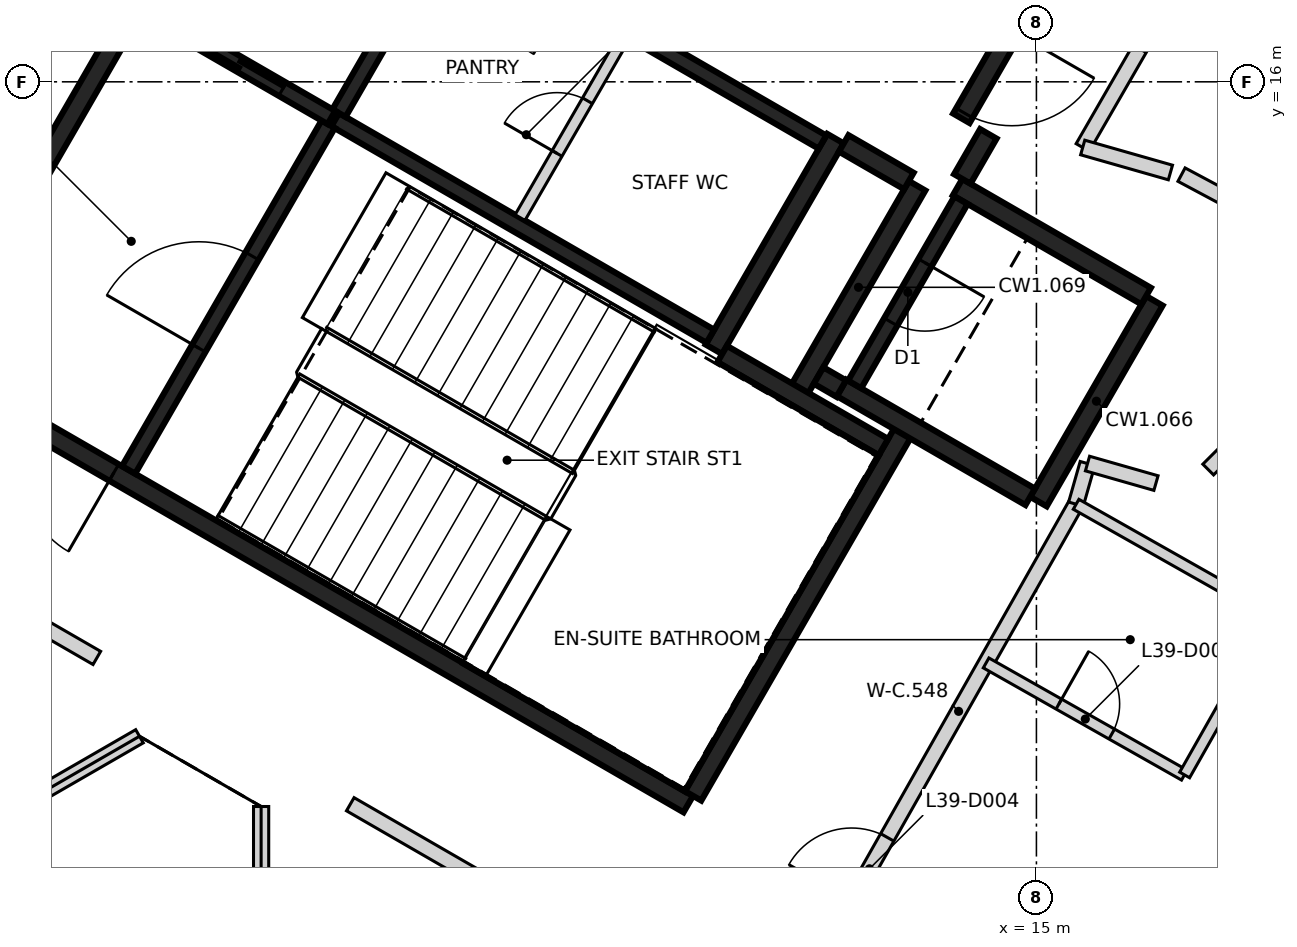
"""IFC4 building model, lengths in metres.
Left out: names, types, materials, properties, quantities, classifications, styles, units other than length and angle.
Written with IfcOpenShell. Run it as: python <this file> out.ifc"""

import sys

from ifc_helpers import new_model, si_unit, direction, frame, frame_2d, origin, place, context, subcontext, project, spatial, rectangle, extrude, element, fill, save


model = new_model("IFC4")
c1 = context("Model", 3, precision=1e-05, world=origin(), true_north=direction((0.0, 1.0)))
c2 = subcontext(c1, "Body", "Model", "MODEL_VIEW")
j1 = project(units=[si_unit("LENGTHUNIT", "METRE"), si_unit("PLANEANGLEUNIT", "RADIAN")], contexts=[c1])
p1 = place(None, origin())
s1 = spatial("IfcSite", under=j1, at=p1, CompositionType="ELEMENT")
p2 = place(p1, origin())
s2 = spatial("IfcBuilding", under=s1, at=p2, CompositionType="ELEMENT")
p3 = place(p2, frame((0.0, 0.0, 157.6)))
s3 = spatial("IfcBuildingStorey", under=s2, at=p3, CompositionType="ELEMENT", Elevation=157.6)
p4 = place(p3, frame((10.42, 6.498, 0.0), z_axis=(0.0, 0.0, 1.0), x_axis=(-0.866021906294, 0.500006057782, 0.0)))
e1 = element("IfcWall", 1, at=p4, inside=s3, PredefinedType="SHEAR", context=c2, shape_type="SweptSolid", body=[
    extrude(rectangle(XDim=11.55, YDim=0.25, at=frame_2d((5.775, 0.0))), origin(), (0.0, 0.0, 1.0), 3.2),
])
p5 = place(p4, frame((10.025, 0.0, 0.0)))
e2 = element("IfcOpeningElement", 2, at=p5, cuts=e1, PredefinedType="OPENING", context=c2, shape_type="SweptSolid", body=[
    extrude(rectangle(XDim=1.2, YDim=2.1, at=frame_2d((0.6, 1.05))), frame((0.0, 0.135, 0.0), z_axis=(0.0, -1.0, 0.0), x_axis=(1.0, 0.0, 0.0)), (0.0, 0.0, 1.0), 0.27),
])
p6 = place(p4, frame((8.725, 0.0, 0.0)))
e3 = element("IfcOpeningElement", 3, at=p6, cuts=e1, PredefinedType="OPENING", context=c2, shape_type="SweptSolid", body=[
    extrude(rectangle(XDim=1.2, YDim=2.1, at=frame_2d((0.6, 1.05))), frame((0.0, 0.135, 0.0), z_axis=(0.0, -1.0, 0.0), x_axis=(1.0, 0.0, 0.0)), (0.0, 0.0, 1.0), 0.27),
])
p7 = place(p3, frame((0.48, 12.381, 0.0), z_axis=(0.0, 0.0, 1.0), x_axis=(0.49999885962, 0.866026062182, 0.0)))
e4 = element("IfcWall", 4, at=p7, inside=s3, PredefinedType="SHEAR", context=c2, shape_type="SweptSolid", body=[
    extrude(rectangle(XDim=5.225, YDim=0.25, at=frame_2d((2.612, 0.0))), origin(), (0.0, 0.0, 1.0), 3.2),
])
p8 = place(p3, frame((13.238, 11.378, 0.0), z_axis=(0.0, 0.0, 1.0), x_axis=(-0.500008851346, -0.866020293397, 0.0)))
e5 = element("IfcWall", 5, at=p8, inside=s3, PredefinedType="SHEAR", context=c2, shape_type="SweptSolid", body=[
    extrude(rectangle(XDim=5.51, YDim=0.25, at=frame_2d((2.755, 0.0))), origin(), (0.0, 0.0, 1.0), 3.2),
])
p9 = place(p3, frame((12.357, 15.252, 0.0), z_axis=(0.0, 0.0, 1.0), x_axis=(-0.500028443584, -0.866008981251, 0.0)))
e6 = element("IfcWall", 6, at=p9, inside=s3, PredefinedType="SHEAR", context=c2, shape_type="SweptSolid", body=[
    extrude(rectangle(XDim=3.2, YDim=0.25, at=frame_2d((1.6, 0.0))), origin(), (0.0, 0.0, 1.0), 3.2),
])
p10 = place(p3, frame((16.552, 13.119, 0.0), z_axis=(0.0, 0.0, 1.0), x_axis=(-0.499978833458, -0.866037623948, 0.0)))
e7 = element("IfcWall", 7, at=p10, inside=s3, PredefinedType="SHEAR", context=c2, shape_type="SweptSolid", body=[
    extrude(rectangle(XDim=3.05, YDim=0.25, at=frame_2d((1.525, 0.0))), origin(), (0.0, 0.0, 1.0), 3.2),
])
p11 = place(p3, frame((14.918, 10.54, 0.0), z_axis=(0.0, 0.0, 1.0), x_axis=(-0.866063538972, 0.499933942099, 0.0)))
e8 = element("IfcWall", 8, at=p11, inside=s3, PredefinedType="SHEAR", context=c2, shape_type="SweptSolid", body=[
    extrude(rectangle(XDim=2.865, YDim=0.25, at=frame_2d((1.432, 0.0))), origin(), (0.0, 0.0, 1.0), 3.2),
])
p12 = place(p3, frame((13.963, 14.614, 0.0), z_axis=(0.0, 0.0, 1.0), x_axis=(0.866042235819, -0.499970844928, 0.0)))
e9 = element("IfcWall", 9, at=p12, inside=s3, PredefinedType="SHEAR", context=c2, shape_type="SweptSolid", body=[
    extrude(rectangle(XDim=2.865, YDim=0.25, at=frame_2d((1.432, 0.0))), origin(), (0.0, 0.0, 1.0), 3.2),
])
p13 = place(p3, frame((11.888, 11.961, 0.0), z_axis=(0.0, 0.0, 1.0), x_axis=(0.500003324108, 0.866023484601, 0.0)))
e10 = element("IfcWall", 10, at=p13, inside=s3, PredefinedType="SHEAR", context=c2, shape_type="SweptSolid", body=[
    extrude(rectangle(XDim=3.085, YDim=0.25, at=frame_2d((1.542, 0.0))), origin(), (0.0, 0.0, 1.0), 3.2),
])
p14 = place(p3, frame((10.865, 12.418, 0.0), z_axis=(0.0, 0.0, 1.0), x_axis=(0.866026229868, -0.499998569178, 0.0)))
e11 = element("IfcWall", 11, at=p14, inside=s3, PredefinedType="SHEAR", context=c2, shape_type="SweptSolid", body=[
    extrude(rectangle(XDim=2.449, YDim=0.25, at=frame_2d((1.225, 0.0))), origin(), (0.0, 0.0, 1.0), 3.2),
])
p15 = place(p3, frame((14.945, 17.135, 0.0), z_axis=(0.0, 0.0, 1.0), x_axis=(-0.499983108224, -0.866035156036, 0.0)))
e12 = element("IfcWall", 12, at=p15, inside=s3, PredefinedType="SHEAR", context=c2, shape_type="SweptSolid", body=[
    extrude(rectangle(XDim=1.865, YDim=0.25, at=frame_2d((0.932, 0.0))), origin(), (0.0, 0.0, 1.0), 3.2),
])
p16 = place(p15, frame((0.535, 0.0, 0.0)))
e13 = element("IfcOpeningElement", 13, at=p16, cuts=e12, PredefinedType="OPENING", context=c2, shape_type="SweptSolid", body=[
    extrude(rectangle(XDim=1.25, YDim=2.1, at=frame_2d((0.625, 1.05))), frame((0.0, 0.135, 0.0), z_axis=(0.0, -1.0, 0.0), x_axis=(1.0, 0.0, 0.0)), (0.0, 0.0, 1.0), 0.27),
])
p17 = place(p3, frame((13.322, 14.695, 0.0), z_axis=(0.0, 0.0, 1.0), x_axis=(-0.866017078145, 0.500014420154, 0.0)))
e14 = element("IfcWall", 14, at=p17, inside=s3, PredefinedType="SHEAR", context=c2, shape_type="SweptSolid", body=[
    extrude(rectangle(XDim=0.989, YDim=0.25, at=frame_2d((0.495, 0.0))), origin(), (0.0, 0.0, 1.0), 3.2),
])
p18 = place(p3, frame((14.368, 15.315, 0.0), z_axis=(0.0, 0.0, 1.0), x_axis=(-0.499897359611, -0.866084655132, 0.0)))
e15 = element("IfcWall", 15, at=p18, inside=s3, PredefinedType="SHEAR", context=c2, shape_type="SweptSolid", body=[
    extrude(rectangle(XDim=0.685, YDim=0.25, at=frame_2d((0.342, 0.0))), origin(), (0.0, 0.0, 1.0), 3.2),
])
p19 = place(p3, frame((12.433, 11.964, 0.0), z_axis=(0.0, 0.0, 1.0), x_axis=(-0.866055875208, 0.499947218231, 0.0)))
e16 = element("IfcWall", 16, at=p19, inside=s3, PredefinedType="SHEAR", context=c2, shape_type="SweptSolid", body=[
    extrude(rectangle(XDim=0.345, YDim=0.25, at=frame_2d((0.172, 0.0))), origin(), (0.0, 0.0, 1.0), 3.2),
])
p20 = place(p3, frame((5.775, 15.502, 0.0), z_axis=(0.0, 0.0, 1.0), x_axis=(0.866020080793, -0.500009219579, 0.0)))
e17 = element("IfcWall", 17, at=p20, inside=s3, PredefinedType="SHEAR", context=c2, shape_type="SweptSolid", body=[
    extrude(rectangle(XDim=5.699, YDim=0.2, at=frame_2d((2.85, 0.0))), origin(), (0.0, 0.0, 1.0), 3.2),
])
p21 = place(p3, frame((12.185, 15.207, 0.0), z_axis=(0.0, 0.0, 1.0), x_axis=(-0.866020080793, 0.500009219579, 0.0)))
e18 = element("IfcWall", 18, at=p21, inside=s3, PredefinedType="SHEAR", context=c2, shape_type="SweptSolid", body=[
    extrude(rectangle(XDim=5.699, YDim=0.2, at=frame_2d((2.85, 0.0))), origin(), (0.0, 0.0, 1.0), 3.2),
])
p22 = place(p21, frame((3.874, 0.0, 0.0)))
e19 = element("IfcOpeningElement", 19, at=p22, cuts=e18, PredefinedType="OPENING", context=c2, shape_type="SweptSolid", body=[
    extrude(rectangle(XDim=0.9, YDim=2.1, at=frame_2d((0.45, 1.05))), frame((0.0, 0.11, 0.0), z_axis=(0.0, -1.0, 0.0), x_axis=(1.0, 0.0, 0.0)), (0.0, 0.0, 1.0), 0.22),
])
p23 = place(p3, frame((3.057, 10.895, 0.0), z_axis=(0.0, 0.0, 1.0), x_axis=(0.499989418164, 0.866031513124, 0.0)))
e20 = element("IfcWall", 20, at=p23, inside=s3, PredefinedType="SHEAR", context=c2, shape_type="SweptSolid", body=[
    extrude(rectangle(XDim=5.251, YDim=0.2, at=frame_2d((2.625, 0.0))), origin(), (0.0, 0.0, 1.0), 3.2),
])
p24 = place(p23, frame((1.849, 0.0, 0.0)))
e21 = element("IfcOpeningElement", 21, at=p24, cuts=e20, PredefinedType="OPENING", context=c2, shape_type="SweptSolid", body=[
    extrude(rectangle(XDim=1.4, YDim=2.1, at=frame_2d((0.7, 1.05))), frame((0.0, 0.11, 0.0), z_axis=(0.0, -1.0, 0.0), x_axis=(1.0, 0.0, 0.0)), (0.0, 0.0, 1.0), 0.22),
])
p25 = place(p3, frame((14.008, 14.442, 0.0), z_axis=(0.0, 0.0, 1.0), x_axis=(-0.499986818241, -0.866033014143, 0.0)))
e22 = element("IfcWall", 22, at=p25, inside=s3, PredefinedType="SHEAR", context=c2, shape_type="SweptSolid", body=[
    extrude(rectangle(XDim=2.798, YDim=0.2, at=frame_2d((1.399, 0.0))), origin(), (0.0, 0.0, 1.0), 3.2),
])
p26 = place(p25, frame((0.949, 0.0, 0.0)))
e23 = element("IfcOpeningElement", 23, at=p26, cuts=e22, PredefinedType="OPENING", context=c2, shape_type="SweptSolid", body=[
    extrude(rectangle(XDim=0.9, YDim=2.1, at=frame_2d((0.45, 1.05))), frame((0.0, 0.11, 0.0), z_axis=(0.0, -1.0, 0.0), x_axis=(1.0, 0.0, 0.0)), (0.0, 0.0, 1.0), 0.22),
])
p27 = place(p3, frame((7.199, 17.97, 0.0), z_axis=(0.0, 0.0, 1.0), x_axis=(-0.499968400327, -0.866043647095, 0.0)))
e24 = element("IfcWall", 24, at=p27, inside=s3, PredefinedType="SHEAR", context=c2, shape_type="SweptSolid", body=[
    extrude(rectangle(XDim=2.75, YDim=0.2, at=frame_2d((1.375, 0.0))), origin(), (0.0, 0.0, 1.0), 3.2),
])
p28 = place(p3, frame((5.725, 15.531, 0.0), z_axis=(0.0, 0.0, 1.0), x_axis=(-0.866037306777, 0.499979382845, 0.0)))
e25 = element("IfcWall", 25, at=p28, inside=s3, PredefinedType="SHEAR", context=c2, shape_type="SweptSolid", body=[
    extrude(rectangle(XDim=2.742, YDim=0.2, at=frame_2d((1.371, 0.0))), origin(), (0.0, 0.0, 1.0), 3.2),
])
p29 = place(p28, frame((0.743, 0.0, 0.0)))
e26 = element("IfcOpeningElement", 26, at=p29, cuts=e25, PredefinedType="OPENING", context=c2, shape_type="SweptSolid", body=[
    extrude(rectangle(XDim=1.3, YDim=2.1, at=frame_2d((0.65, 1.05))), frame((0.0, 0.11, 0.0), z_axis=(0.0, -1.0, 0.0), x_axis=(1.0, 0.0, 0.0)), (0.0, 0.0, 1.0), 0.22),
])
p30 = place(p3, frame((8.207, 14.214, 0.0), z_axis=(0.0, 0.0, 1.0), x_axis=(0.499922376475, 0.866070215109, 0.0)))
e27 = element("IfcWall", 27, at=p30, inside=s3, PredefinedType="PARTITIONING", context=c2, shape_type="SweptSolid", body=[
    extrude(rectangle(XDim=2.749, YDim=0.15, at=frame_2d((1.374, 0.0))), origin(), (0.0, 0.0, 1.0), 3.2),
])
p31 = place(p30, frame((0.974, 0.0, 0.0)))
e28 = element("IfcOpeningElement", 28, at=p31, cuts=e27, PredefinedType="OPENING", context=c2, shape_type="SweptSolid", body=[
    extrude(rectangle(XDim=0.8, YDim=2.1, at=frame_2d((0.4, 1.05))), frame((0.0, 0.085, 0.0), z_axis=(0.0, -1.0, 0.0), x_axis=(1.0, 0.0, 0.0)), (0.0, 0.0, 1.0), 0.17),
])
p32 = place(p3, frame((0.612, 9.591, 0.0), z_axis=(0.0, 0.0, 1.0), x_axis=(0.866077886601, -0.499909086075, 0.0)))
e29 = element("IfcWall", 29, at=p32, inside=s3, PredefinedType="PARTITIONING", context=c2, shape_type="SweptSolid", body=[
    extrude(rectangle(XDim=2.34, YDim=0.2, at=frame_2d((1.17, 0.0))), origin(), (0.0, 0.0, 1.0), 3.2),
])
p33 = place(p3, frame((5.973, 6.496, 0.0), z_axis=(0.0, 0.0, 1.0), x_axis=(0.866058792507, -0.499942164577, 0.0)))
e30 = element("IfcWall", 30, at=p33, inside=s3, PredefinedType="PARTITIONING", context=c2, shape_type="SweptSolid", body=[
    extrude(rectangle(XDim=2.341, YDim=0.2, at=frame_2d((1.17, 0.0))), origin(), (0.0, 0.0, 1.0), 3.2),
])
p34 = place(p3, frame((12.433, 4.992, 0.0), z_axis=(0.0, 0.0, 1.0), x_axis=(0.492618265192, 0.870245508348, 0.0)))
e31 = element("IfcWall", 31, at=p34, inside=s3, PredefinedType="PARTITIONING", context=c2, shape_type="SweptSolid", body=[
    extrude(rectangle(XDim=6.265, YDim=0.2, at=frame_2d((3.133, 0.0))), origin(), (0.0, 0.0, 1.0), 3.2),
])
p35 = place(p34, frame((0.277, 0.0, 0.0)))
e32 = element("IfcOpeningElement", 32, at=p35, cuts=e31, PredefinedType="OPENING", context=c2, shape_type="SweptSolid", body=[
    extrude(rectangle(XDim=0.95, YDim=2.1, at=frame_2d((0.475, 1.05))), frame((0.0, 0.11, 0.0), z_axis=(0.0, -1.0, 0.0), x_axis=(1.0, 0.0, 0.0)), (0.0, 0.0, 1.0), 0.22),
])
p36 = place(p3, frame((15.156, 17.13, 0.0), z_axis=(0.0, 0.0, 1.0), x_axis=(0.865755062894, -0.500467952093, 0.0)))
e33 = element("IfcWall", 33, at=p36, inside=s3, PredefinedType="PARTITIONING", context=c2, shape_type="SweptSolid", body=[
    extrude(rectangle(XDim=1.389, YDim=0.2, at=frame_2d((0.694, 0.0))), origin(), (0.0, 0.0, 1.0), 3.2),
])
p37 = place(p3, frame((15.52, 10.444, 0.0), z_axis=(0.0, 0.0, 1.0), x_axis=(0.273965995931, 0.961739378976, 0.0)))
e34 = element("IfcWall", 34, at=p37, inside=s3, PredefinedType="PARTITIONING", context=c2, shape_type="SweptSolid", body=[
    extrude(rectangle(XDim=0.555, YDim=0.2, at=frame_2d((0.278, 0.0))), origin(), (0.0, 0.0, 1.0), 3.2),
])
p38 = place(p3, frame((15.609, 15.136, 0.0), z_axis=(0.0, 0.0, 1.0), x_axis=(0.499501622561, 0.866312950993, 0.0)))
e35 = element("IfcWall", 35, at=p38, inside=s3, PredefinedType="PARTITIONING", context=c2, shape_type="SweptSolid", body=[
    extrude(rectangle(XDim=1.5, YDim=0.2, at=frame_2d((0.75, 0.0))), origin(), (0.0, 0.0, 1.0), 3.2),
])
p39 = place(p3, frame((15.609, 15.136, 0.0), z_axis=(0.0, 0.0, 1.0), x_axis=(0.961662011825, -0.274237442763, 0.0)))
e36 = element("IfcWall", 36, at=p39, inside=s3, PredefinedType="PARTITIONING", context=c2, shape_type="SweptSolid", body=[
    extrude(rectangle(XDim=1.2, YDim=0.2, at=frame_2d((0.6, 0.0))), origin(), (0.0, 0.0, 1.0), 3.2),
])
p40 = place(p3, frame((15.672, 10.978, 0.0), z_axis=(0.0, 0.0, 1.0), x_axis=(0.961612403256, -0.274411344344, 0.0)))
e37 = element("IfcWall", 37, at=p40, inside=s3, PredefinedType="PARTITIONING", context=c2, shape_type="SweptSolid", body=[
    extrude(rectangle(XDim=0.937, YDim=0.2, at=frame_2d((0.468, 0.0))), origin(), (0.0, 0.0, 1.0), 3.2),
])
p41 = place(p3, frame((16.909, 14.779, 0.0), z_axis=(0.0, 0.0, 1.0), x_axis=(0.882045575366, -0.471164093472, 0.0)))
e38 = element("IfcWall", 38, at=p41, inside=s3, PredefinedType="PARTITIONING", context=c2, shape_type="SweptSolid", body=[
    extrude(rectangle(XDim=1.628, YDim=0.2, at=frame_2d((0.814, 0.0))), origin(), (0.0, 0.0, 1.0), 3.2),
])
p42 = place(p3, frame((17.26, 10.899, 0.0), z_axis=(0.0, 0.0, 1.0), x_axis=(0.707106781187, 0.707106781187, 0.0)))
e39 = element("IfcWall", 39, at=p42, inside=s3, PredefinedType="PARTITIONING", context=c2, shape_type="SweptSolid", body=[
    extrude(rectangle(XDim=1.768, YDim=0.2, at=frame_2d((0.884, 0.0))), origin(), (0.0, 0.0, 1.0), 3.2),
])
p43 = place(p3, frame((-8.0, 0.924, 0.0), z_axis=(0.0, 0.0, 1.0), x_axis=(0.86604129137, 0.499972480886, 0.0)))
e40 = element("IfcWall", 40, at=p43, inside=s3, PredefinedType="PARTITIONING", context=c2, shape_type="SweptSolid", body=[
    extrude(rectangle(XDim=12.932, YDim=0.2, at=frame_2d((6.466, 0.0))), origin(), (0.0, 0.0, 1.0), 2.3),
])
p44 = place(p3, frame((4.8, -6.466, 0.0), z_axis=(0.0, 0.0, 1.0), x_axis=(0.0, 1.0, 0.0)))
e41 = element("IfcWall", 41, at=p44, inside=s3, PredefinedType="PARTITIONING", context=c2, shape_type="SweptSolid", body=[
    extrude(rectangle(XDim=12.932, YDim=0.2, at=frame_2d((6.466, 0.0))), origin(), (0.0, 0.0, 1.0), 2.3),
])
p45 = place(p3, frame((14.338, 8.355, 0.0), z_axis=(0.0, 0.0, 1.0), x_axis=(0.870291117047, -0.49253768545, 0.0)))
e42 = element("IfcWall", 42, at=p45, inside=s3, PredefinedType="PARTITIONING", context=c2, shape_type="SweptSolid", body=[
    extrude(rectangle(XDim=2.997, YDim=0.15, at=frame_2d((1.499, 0.0))), origin(), (0.0, 0.0, 1.0), 3.2),
])
p46 = place(p45, frame((1.1, 0.0, 0.0)))
e43 = element("IfcOpeningElement", 43, at=p46, cuts=e42, PredefinedType="OPENING", context=c2, shape_type="SweptSolid", body=[
    extrude(rectangle(XDim=0.8, YDim=2.1, at=frame_2d((0.4, 1.05))), frame((0.0, 0.085, 0.0), z_axis=(0.0, -1.0, 0.0), x_axis=(1.0, 0.0, 0.0)), (0.0, 0.0, 1.0), 0.17),
])
p47 = place(p3, frame((15.522, 10.442, 0.0), z_axis=(0.0, 0.0, 1.0), x_axis=(0.870427634909, -0.492296386729, 0.0)))
e44 = element("IfcWall", 44, at=p47, inside=s3, PredefinedType="PARTITIONING", context=c2, shape_type="SweptSolid", body=[
    extrude(rectangle(XDim=2.994, YDim=0.15, at=frame_2d((1.497, 0.0))), origin(), (0.0, 0.0, 1.0), 3.2),
])
p48 = place(p3, frame((16.95, 6.881, 0.0), z_axis=(0.0, 0.0, 1.0), x_axis=(0.49287361781, 0.870100911887, 0.0)))
e45 = element("IfcWall", 45, at=p48, inside=s3, PredefinedType="PARTITIONING", context=c2, shape_type="SweptSolid", body=[
    extrude(rectangle(XDim=2.394, YDim=0.15, at=frame_2d((1.197, 0.0))), origin(), (0.0, 0.0, 1.0), 3.2),
])
p49 = place(p29, origin())
e46 = element("IfcDoor", 46, at=p49, inside=s3, OperationType="SLIDING_TO_LEFT", PredefinedType="DOOR", context=c2, shape_type="SweptSolid", body=[
    extrude(rectangle(XDim=1.3, YDim=2.1, at=frame_2d((0.65, 1.05))), frame((0.0, 0.025, 0.0), z_axis=(0.0, -1.0, 0.0), x_axis=(1.0, 0.0, 0.0)), (0.0, 0.0, 1.0), 0.05),
])
fill(e26, e46)
p50 = place(p16, origin())
e47 = element("IfcDoor", 47, at=p50, inside=s3, OperationType="SINGLE_SWING_LEFT", PredefinedType="DOOR", context=c2, shape_type="SweptSolid", body=[
    extrude(rectangle(XDim=1.25, YDim=2.1, at=frame_2d((0.625, 1.05))), frame((0.0, 0.025, 0.0), z_axis=(0.0, -1.0, 0.0), x_axis=(1.0, 0.0, 0.0)), (0.0, 0.0, 1.0), 0.05),
])
fill(e13, e47)
p51 = place(p6, origin())
e48 = element("IfcDoor", 48, at=p51, inside=s3, OperationType="SINGLE_SWING_RIGHT", PredefinedType="DOOR", context=c2, shape_type="SweptSolid", body=[
    extrude(rectangle(XDim=1.2, YDim=2.1, at=frame_2d((0.6, 1.05))), frame((0.0, 0.025, 0.0), z_axis=(0.0, -1.0, 0.0), x_axis=(1.0, 0.0, 0.0)), (0.0, 0.0, 1.0), 0.05),
])
fill(e3, e48)
p52 = place(p24, origin())
e49 = element("IfcDoor", 49, at=p52, inside=s3, OperationType="SINGLE_SWING_LEFT", PredefinedType="DOOR", context=c2, shape_type="SweptSolid", body=[
    extrude(rectangle(XDim=1.4, YDim=2.1, at=frame_2d((0.7, 1.05))), frame((0.0, 0.025, 0.0), z_axis=(0.0, -1.0, 0.0), x_axis=(1.0, 0.0, 0.0)), (0.0, 0.0, 1.0), 0.05),
])
fill(e21, e49)
p53 = place(p26, origin())
e50 = element("IfcDoor", 50, at=p53, inside=s3, OperationType="SINGLE_SWING_LEFT", PredefinedType="DOOR", context=c2, shape_type="SweptSolid", body=[
    extrude(rectangle(XDim=0.9, YDim=2.1, at=frame_2d((0.45, 1.05))), frame((0.0, 0.025, 0.0), z_axis=(0.0, -1.0, 0.0), x_axis=(1.0, 0.0, 0.0)), (0.0, 0.0, 1.0), 0.05),
])
fill(e23, e50)
p54 = place(p31, origin())
e51 = element("IfcDoor", 51, at=p54, inside=s3, OperationType="SINGLE_SWING_RIGHT", PredefinedType="DOOR", context=c2, shape_type="SweptSolid", body=[
    extrude(rectangle(XDim=0.8, YDim=2.1, at=frame_2d((0.4, 1.05))), frame((0.0, 0.025, 0.0), z_axis=(0.0, -1.0, 0.0), x_axis=(1.0, 0.0, 0.0)), (0.0, 0.0, 1.0), 0.05),
])
fill(e28, e51)
p55 = place(p35, origin())
e52 = element("IfcDoor", 52, at=p55, inside=s3, OperationType="SINGLE_SWING_LEFT", PredefinedType="DOOR", context=c2, shape_type="SweptSolid", body=[
    extrude(rectangle(XDim=0.95, YDim=2.1, at=frame_2d((0.475, 1.05))), frame((0.0, 0.025, 0.0), z_axis=(0.0, -1.0, 0.0), x_axis=(1.0, 0.0, 0.0)), (0.0, 0.0, 1.0), 0.05),
])
fill(e32, e52)
p56 = place(p46, origin())
e53 = element("IfcDoor", 53, at=p56, inside=s3, OperationType="SINGLE_SWING_LEFT", PredefinedType="DOOR", context=c2, shape_type="SweptSolid", body=[
    extrude(rectangle(XDim=0.8, YDim=2.1, at=frame_2d((0.4, 1.05))), frame((0.0, 0.025, 0.0), z_axis=(0.0, -1.0, 0.0), x_axis=(1.0, 0.0, 0.0)), (0.0, 0.0, 1.0), 0.05),
])
fill(e43, e53)
save(model, sys.argv[1])
